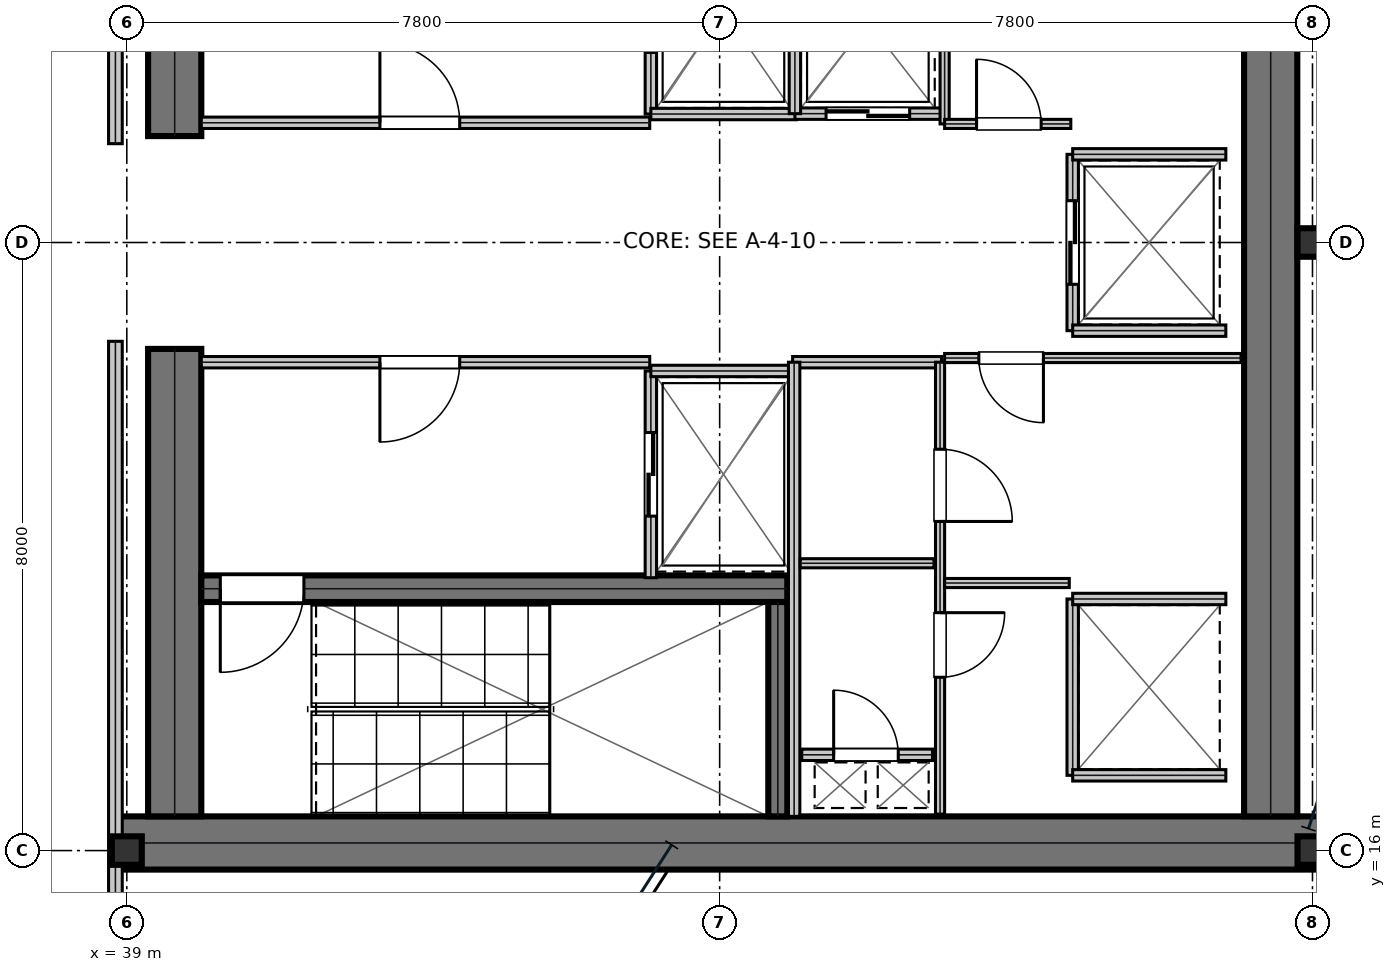
"""IFC4 building model, lengths in metres.
Left out: names, types, materials, properties, quantities, classifications, styles, units other than length and angle.
Written with IfcOpenShell. Run it as: python <this file> out.ifc"""

import sys

from ifc_helpers import new_model, si_unit, direction, frame, frame_2d, origin, origin_2d, place, context, subcontext, project, spatial, rectangle, i_section, extrude, element, fill, save


model = new_model("IFC4")
c1 = context("Model", 3, precision=1e-05, world=origin(), true_north=direction((0.0, 1.0)))
c2 = subcontext(c1, "Body", "Model", "MODEL_VIEW")
j1 = project(units=[si_unit("LENGTHUNIT", "METRE"), si_unit("PLANEANGLEUNIT", "RADIAN")], contexts=[c1])
p1 = place(None, origin())
s1 = spatial("IfcSite", under=j1, at=p1, CompositionType="ELEMENT")
p2 = place(p1, origin())
s2 = spatial("IfcBuilding", under=s1, at=p2, CompositionType="ELEMENT")
p3 = place(p2, frame((0.0, 0.0, 199.95)))
s3 = spatial("IfcBuildingStorey", under=s2, at=p3, CompositionType="ELEMENT", Elevation=199.95)
p4 = place(p3, frame((38.8, 16.1, 0.0), z_axis=(0.0, 0.0, 1.0), x_axis=(1.0, 0.0, 0.0)))
e1 = element("IfcWall", 1, at=p4, inside=s3, PredefinedType="SHEAR", context=c2, shape_type="SweptSolid", body=[
    extrude(rectangle(XDim=16.0, YDim=0.7, at=frame_2d((8.0, 0.0))), origin(), (0.0, 0.0, 1.0), 3.79),
])
for number, where, z_axis, x_axis in (
    (2, (39.63, 16.45, 0.0), (0.0, 0.0, 1.0), (0.0, 1.0, 0.0)),
    (3, (39.63, 25.4, 0.0), (0.0, 0.0, 1.0), (0.0, 1.0, 0.0)),
):
    element("IfcWall", number, at=place(p3, frame(where, z_axis=z_axis, x_axis=x_axis)), inside=s3, PredefinedType="SHEAR", context=c2, shape_type="SweptSolid", body=[
        extrude(rectangle(XDim=6.15, YDim=0.7, at=frame_2d((3.075, 0.0))), origin(), (0.0, 0.0, 1.0), 3.79),
    ])
p5 = place(p3, frame((54.05, 16.45, 0.0), z_axis=(0.0, 0.0, 1.0), x_axis=(0.0, 1.0, 0.0)))
e4 = element("IfcWall", 4, at=p5, inside=s3, PredefinedType="SHEAR", context=c2, shape_type="SweptSolid", body=[
    extrude(rectangle(XDim=15.1, YDim=0.7, at=frame_2d((7.55, 0.0))), origin(), (0.0, 0.0, 1.0), 3.79),
])
p6 = place(p3, frame((39.98, 19.445, 0.0), z_axis=(0.0, 0.0, 1.0), x_axis=(1.0, 0.0, 0.0)))
e5 = element("IfcWall", 5, at=p6, inside=s3, PredefinedType="SHEAR", context=c2, shape_type="SweptSolid", body=[
    extrude(rectangle(XDim=7.71, YDim=0.35, at=frame_2d((3.855, 0.0))), origin(), (0.0, 0.0, 1.0), 3.79),
])
p7 = place(p6, frame((0.25, 0.0, 0.0)))
e6 = element("IfcOpeningElement", 6, at=p7, cuts=e5, PredefinedType="OPENING", context=c2, shape_type="SweptSolid", body=[
    extrude(rectangle(XDim=1.1, YDim=2.15, at=frame_2d((0.55, 1.075))), frame((0.0, 0.185, 0.0), z_axis=(0.0, -1.0, 0.0), x_axis=(1.0, 0.0, 0.0)), (0.0, 0.0, 1.0), 0.37),
])
p8 = place(p3, frame((47.565, 16.45, 0.0), z_axis=(0.0, 0.0, 1.0), x_axis=(0.0, 1.0, 0.0)))
e7 = element("IfcWall", 7, at=p8, inside=s3, PredefinedType="SHEAR", context=c2, shape_type="SweptSolid", body=[
    extrude(rectangle(XDim=2.82, YDim=0.25, at=frame_2d((1.41, 0.0))), origin(), (0.0, 0.0, 1.0), 3.79),
])
for number, where, z_axis, x_axis in (
    (8, (39.0, 16.0, 0.0), (0.0, 0.0, 1.0), (1.0, 0.0, 0.0)),
    (9, (54.6, 16.0, 0.0), (0.0, 0.0, 1.0), (1.0, 0.0, 0.0)),
    (10, (54.6, 24.0, 0.0), (0.0, 0.0, 1.0), (1.0, 0.0, 0.0)),
):
    element("IfcColumn", number, at=place(p3, frame(where, z_axis=z_axis, x_axis=x_axis)), inside=s3, PredefinedType="COLUMN", context=c2, shape_type="SweptSolid", body=[
        extrude(i_section(OverallWidth=0.394, OverallDepth=0.375, WebThickness=0.017, FlangeThickness=0.028, at=origin_2d()), origin(), (0.0, 0.0, 1.0), 4.044),
    ])
p9 = place(p3, frame((39.98, 25.575, 0.0), z_axis=(0.0, 0.0, 1.0), x_axis=(1.0, 0.0, 0.0)))
e11 = element("IfcWall", 11, at=p9, inside=s3, PredefinedType="PARTITIONING", context=c2, shape_type="SweptSolid", body=[
    extrude(rectangle(XDim=5.9, YDim=0.15, at=frame_2d((2.95, 0.0))), origin(), (0.0, 0.0, 1.0), 3.79),
])
p10 = place(p9, frame((2.35, 0.0, 0.0)))
e12 = element("IfcOpeningElement", 12, at=p10, cuts=e11, PredefinedType="OPENING", context=c2, shape_type="SweptSolid", body=[
    extrude(rectangle(XDim=1.05, YDim=2.15, at=frame_2d((0.525, 1.075))), frame((0.0, 0.085, 0.0), z_axis=(0.0, -1.0, 0.0), x_axis=(1.0, 0.0, 0.0)), (0.0, 0.0, 1.0), 0.17),
])
p11 = place(p3, frame((39.98, 22.425, 0.0), z_axis=(0.0, 0.0, 1.0), x_axis=(1.0, 0.0, 0.0)))
e13 = element("IfcWall", 13, at=p11, inside=s3, PredefinedType="PARTITIONING", context=c2, shape_type="SweptSolid", body=[
    extrude(rectangle(XDim=5.9, YDim=0.15, at=frame_2d((2.95, 0.0))), origin(), (0.0, 0.0, 1.0), 3.79),
])
p12 = place(p11, frame((2.35, 0.0, 0.0)))
e14 = element("IfcOpeningElement", 14, at=p12, cuts=e13, PredefinedType="OPENING", context=c2, shape_type="SweptSolid", body=[
    extrude(rectangle(XDim=1.05, YDim=2.15, at=frame_2d((0.525, 1.075))), frame((0.0, 0.085, 0.0), z_axis=(0.0, -1.0, 0.0), x_axis=(1.0, 0.0, 0.0)), (0.0, 0.0, 1.0), 0.17),
])
p13 = place(p3, frame((45.895, 25.69, 0.0), z_axis=(0.0, 0.0, 1.0), x_axis=(0.0, 1.0, 0.0)))
e15 = element("IfcWall", 15, at=p13, inside=s3, PredefinedType="PARTITIONING", context=c2, shape_type="SweptSolid", body=[
    extrude(rectangle(XDim=2.72, YDim=0.15, at=frame_2d((1.36, 0.0))), origin(), (0.0, 0.0, 1.0), 3.79),
])
p14 = place(p13, frame((0.81, 0.0, 0.0)))
e16 = element("IfcOpeningElement", 16, at=p14, cuts=e15, PredefinedType="OPENING", context=c2, shape_type="SweptSolid", body=[
    extrude(rectangle(XDim=1.1, YDim=2.15, at=frame_2d((0.55, 1.075))), frame((0.0, 0.085, 0.0), z_axis=(0.0, -1.0, 0.0), x_axis=(1.0, 0.0, 0.0)), (0.0, 0.0, 1.0), 0.17),
])
p15 = place(p3, frame((45.895, 25.69, 0.0), z_axis=(0.0, 0.0, 1.0), x_axis=(1.0, 0.0, 0.0)))
e17 = element("IfcWall", 17, at=p15, inside=s3, PredefinedType="PARTITIONING", context=c2, shape_type="SweptSolid", body=[
    extrude(rectangle(XDim=1.915, YDim=0.15, at=frame_2d((0.958, 0.0))), origin(), (0.0, 0.0, 1.0), 3.79),
])
p16 = place(p3, frame((45.895, 19.59, 0.0), z_axis=(0.0, 0.0, 1.0), x_axis=(0.0, 1.0, 0.0)))
e18 = element("IfcWall", 18, at=p16, inside=s3, PredefinedType="PARTITIONING", context=c2, shape_type="SweptSolid", body=[
    extrude(rectangle(XDim=2.72, YDim=0.15, at=frame_2d((1.36, 0.0))), origin(), (0.0, 0.0, 1.0), 3.79),
])
p17 = place(p16, frame((0.81, 0.0, 0.0)))
e19 = element("IfcOpeningElement", 19, at=p17, cuts=e18, PredefinedType="OPENING", context=c2, shape_type="SweptSolid", body=[
    extrude(rectangle(XDim=1.1, YDim=2.15, at=frame_2d((0.55, 1.075))), frame((0.0, 0.085, 0.0), z_axis=(0.0, -1.0, 0.0), x_axis=(1.0, 0.0, 0.0)), (0.0, 0.0, 1.0), 0.17),
])
p18 = place(p3, frame((45.895, 22.31, 0.0), z_axis=(0.0, 0.0, 1.0), x_axis=(1.0, 0.0, 0.0)))
e20 = element("IfcWall", 20, at=p18, inside=s3, PredefinedType="PARTITIONING", context=c2, shape_type="SweptSolid", body=[
    extrude(rectangle(XDim=1.915, YDim=0.15, at=frame_2d((0.958, 0.0))), origin(), (0.0, 0.0, 1.0), 3.79),
])
p19 = place(p3, frame((47.79, 25.695, 0.0), z_axis=(0.0, 0.0, 1.0), x_axis=(1.0, 0.0, 0.0)))
e21 = element("IfcWall", 21, at=p19, inside=s3, PredefinedType="PARTITIONING", context=c2, shape_type="SweptSolid", body=[
    extrude(rectangle(XDim=1.92, YDim=0.15, at=frame_2d((0.96, 0.0))), origin(), (0.0, 0.0, 1.0), 3.79),
])
p20 = place(p19, frame((0.41, 0.0, 0.0)))
e22 = element("IfcOpeningElement", 22, at=p20, cuts=e21, PredefinedType="OPENING", context=c2, shape_type="SweptSolid", body=[
    extrude(rectangle(XDim=1.1, YDim=2.15, at=frame_2d((0.55, 1.075))), frame((0.0, 0.085, 0.0), z_axis=(0.0, -1.0, 0.0), x_axis=(1.0, 0.0, 0.0)), (0.0, 0.0, 1.0), 0.17),
])
p21 = place(p3, frame((47.79, 25.695, 0.0), z_axis=(0.0, 0.0, 1.0), x_axis=(0.0, 1.0, 0.0)))
e23 = element("IfcWall", 23, at=p21, inside=s3, PredefinedType="PARTITIONING", context=c2, shape_type="SweptSolid", body=[
    extrude(rectangle(XDim=2.415, YDim=0.15, at=frame_2d((1.208, 0.0))), origin(), (0.0, 0.0, 1.0), 3.79),
])
p22 = place(p3, frame((51.445, 22.84, 0.0), z_axis=(0.0, 0.0, 1.0), x_axis=(0.0, 1.0, 0.0)))
e24 = element("IfcWall", 24, at=p22, inside=s3, PredefinedType="PARTITIONING", context=c2, shape_type="SweptSolid", body=[
    extrude(rectangle(XDim=2.32, YDim=0.15, at=frame_2d((1.16, 0.0))), origin(), (0.0, 0.0, 1.0), 3.79),
])
p23 = place(p22, frame((0.61, 0.0, 0.0)))
e25 = element("IfcOpeningElement", 25, at=p23, cuts=e24, PredefinedType="OPENING", context=c2, shape_type="SweptSolid", body=[
    extrude(rectangle(XDim=1.1, YDim=2.15, at=frame_2d((0.55, 1.075))), frame((0.0, 0.085, 0.0), z_axis=(0.0, -1.0, 0.0), x_axis=(1.0, 0.0, 0.0)), (0.0, 0.0, 1.0), 0.17),
])
for number, where, z_axis, x_axis in (
    (26, (51.445, 22.84, 0.0), (0.0, 0.0, 1.0), (1.0, 0.0, 0.0)),
    (27, (51.445, 25.16, 0.0), (0.0, 0.0, 1.0), (1.0, 0.0, 0.0)),
):
    element("IfcWall", number, at=place(p3, frame(where, z_axis=z_axis, x_axis=x_axis)), inside=s3, PredefinedType="PARTITIONING", context=c2, shape_type="SweptSolid", body=[
        extrude(rectangle(XDim=2.015, YDim=0.15, at=frame_2d((1.007, 0.0))), origin(), (0.0, 0.0, 1.0), 3.79),
    ])
p24 = place(p3, frame((51.445, 16.99, 0.0), z_axis=(0.0, 0.0, 1.0), x_axis=(0.0, 1.0, 0.0)))
e28 = element("IfcWall", 28, at=p24, inside=s3, PredefinedType="PARTITIONING", context=c2, shape_type="SweptSolid", body=[
    extrude(rectangle(XDim=2.32, YDim=0.15, at=frame_2d((1.16, 0.0))), origin(), (0.0, 0.0, 1.0), 3.79),
])
for number, where, z_axis, x_axis in (
    (29, (51.445, 16.99, 0.0), (0.0, 0.0, 1.0), (1.0, 0.0, 0.0)),
    (30, (51.445, 19.31, 0.0), (0.0, 0.0, 1.0), (1.0, 0.0, 0.0)),
):
    element("IfcWall", number, at=place(p3, frame(where, z_axis=z_axis, x_axis=x_axis)), inside=s3, PredefinedType="PARTITIONING", context=c2, shape_type="SweptSolid", body=[
        extrude(rectangle(XDim=2.015, YDim=0.15, at=frame_2d((1.007, 0.0))), origin(), (0.0, 0.0, 1.0), 3.79),
    ])
p25 = place(p3, frame((47.88, 17.26, 0.0), z_axis=(0.0, 0.0, 1.0), x_axis=(1.0, 0.0, 0.0)))
e31 = element("IfcWall", 31, at=p25, inside=s3, PredefinedType="PARTITIONING", context=c2, shape_type="SweptSolid", body=[
    extrude(rectangle(XDim=1.72, YDim=0.15, at=frame_2d((0.86, 0.0))), origin(), (0.0, 0.0, 1.0), 3.79),
])
p26 = place(p25, frame((0.42, 0.0, 0.0)))
e32 = element("IfcOpeningElement", 32, at=p26, cuts=e31, PredefinedType="OPENING", context=c2, shape_type="SweptSolid", body=[
    extrude(rectangle(XDim=0.85, YDim=2.15, at=frame_2d((0.425, 1.075))), frame((0.0, 0.085, 0.0), z_axis=(0.0, -1.0, 0.0), x_axis=(1.0, 0.0, 0.0)), (0.0, 0.0, 1.0), 0.17),
])
p27 = place(p3, frame((47.76, 22.425, 0.0), z_axis=(0.0, 0.0, 1.0), x_axis=(1.0, 0.0, 0.0)))
e33 = element("IfcWall", 33, at=p27, inside=s3, PredefinedType="PARTITIONING", context=c2, shape_type="SweptSolid", body=[
    extrude(rectangle(XDim=1.96, YDim=0.15, at=frame_2d((0.98, 0.0))), origin(), (0.0, 0.0, 1.0), 3.79),
])
p28 = place(p3, frame((47.78, 16.45, 0.0), z_axis=(0.0, 0.0, 1.0), x_axis=(0.0, 1.0, 0.0)))
e34 = element("IfcWall", 34, at=p28, inside=s3, PredefinedType="PARTITIONING", context=c2, shape_type="SweptSolid", body=[
    extrude(rectangle(XDim=5.975, YDim=0.15, at=frame_2d((2.988, 0.0))), origin(), (0.0, 0.0, 1.0), 3.79),
])
p29 = place(p3, frame((47.86, 19.78, 0.0), z_axis=(0.0, 0.0, 1.0), x_axis=(1.0, 0.0, 0.0)))
e35 = element("IfcWall", 35, at=p29, inside=s3, PredefinedType="PARTITIONING", context=c2, shape_type="SweptSolid", body=[
    extrude(rectangle(XDim=1.76, YDim=0.12, at=frame_2d((0.88, 0.0))), origin(), (0.0, 0.0, 1.0), 3.79),
])
p30 = place(p3, frame((49.7, 16.48, 0.0), z_axis=(0.0, 0.0, 1.0), x_axis=(0.0, 1.0, 0.0)))
e36 = element("IfcWall", 36, at=p30, inside=s3, PredefinedType="PARTITIONING", context=c2, shape_type="SweptSolid", body=[
    extrude(rectangle(XDim=5.945, YDim=0.12, at=frame_2d((2.973, 0.0))), origin(), (0.0, 0.0, 1.0), 3.79),
])
p31 = place(p30, frame((1.8, 0.0, 0.0)))
e37 = element("IfcOpeningElement", 37, at=p31, cuts=e36, PredefinedType="OPENING", context=c2, shape_type="SweptSolid", body=[
    extrude(rectangle(XDim=0.85, YDim=2.15, at=frame_2d((0.425, 1.075))), frame((0.0, 0.07, 0.0), z_axis=(0.0, -1.0, 0.0), x_axis=(1.0, 0.0, 0.0)), (0.0, 0.0, 1.0), 0.14),
])
p32 = place(p30, frame((3.85, 0.0, 0.0)))
e38 = element("IfcOpeningElement", 38, at=p32, cuts=e36, PredefinedType="OPENING", context=c2, shape_type="SweptSolid", body=[
    extrude(rectangle(XDim=0.95, YDim=2.15, at=frame_2d((0.475, 1.075))), frame((0.0, 0.07, 0.0), z_axis=(0.0, -1.0, 0.0), x_axis=(1.0, 0.0, 0.0)), (0.0, 0.0, 1.0), 0.14),
])
p33 = place(p3, frame((49.76, 22.48, 0.0), z_axis=(0.0, 0.0, 1.0), x_axis=(1.0, 0.0, 0.0)))
e39 = element("IfcWall", 39, at=p33, inside=s3, PredefinedType="PARTITIONING", context=c2, shape_type="SweptSolid", body=[
    extrude(rectangle(XDim=3.9, YDim=0.12, at=frame_2d((1.95, 0.0))), origin(), (0.0, 0.0, 1.0), 3.79),
])
p34 = place(p33, frame((0.45, 0.0, 0.0)))
e40 = element("IfcOpeningElement", 40, at=p34, cuts=e39, PredefinedType="OPENING", context=c2, shape_type="SweptSolid", body=[
    extrude(rectangle(XDim=0.85, YDim=2.15, at=frame_2d((0.425, 1.075))), frame((0.0, 0.07, 0.0), z_axis=(0.0, -1.0, 0.0), x_axis=(1.0, 0.0, 0.0)), (0.0, 0.0, 1.0), 0.14),
])
p35 = place(p3, frame((49.76, 19.52, 0.0), z_axis=(0.0, 0.0, 1.0), x_axis=(1.0, 0.0, 0.0)))
e41 = element("IfcWall", 41, at=p35, inside=s3, PredefinedType="PARTITIONING", context=c2, shape_type="SweptSolid", body=[
    extrude(rectangle(XDim=1.64, YDim=0.12, at=frame_2d((0.82, 0.0))), origin(), (0.0, 0.0, 1.0), 3.79),
])
p36 = place(p3, frame((49.76, 25.56, 0.0), z_axis=(0.0, 0.0, 1.0), x_axis=(0.0, 1.0, 0.0)))
e42 = element("IfcWall", 42, at=p36, inside=s3, PredefinedType="PARTITIONING", context=c2, shape_type="SweptSolid", body=[
    extrude(rectangle(XDim=2.66, YDim=0.12, at=frame_2d((1.33, 0.0))), origin(), (0.0, 0.0, 1.0), 3.79),
])
p37 = place(p3, frame((49.76, 25.56, 0.0), z_axis=(0.0, 0.0, 1.0), x_axis=(1.0, 0.0, 0.0)))
e43 = element("IfcWall", 43, at=p37, inside=s3, PredefinedType="PARTITIONING", context=c2, shape_type="SweptSolid", body=[
    extrude(rectangle(XDim=1.66, YDim=0.12, at=frame_2d((0.83, 0.0))), origin(), (0.0, 0.0, 1.0), 3.79),
])
p38 = place(p37, frame((0.42, 0.0, 0.0)))
e44 = element("IfcOpeningElement", 44, at=p38, cuts=e43, PredefinedType="OPENING", context=c2, shape_type="SweptSolid", body=[
    extrude(rectangle(XDim=0.85, YDim=2.15, at=frame_2d((0.425, 1.075))), frame((0.0, 0.07, 0.0), z_axis=(0.0, -1.0, 0.0), x_axis=(1.0, 0.0, 0.0)), (0.0, 0.0, 1.0), 0.14),
])
for number, where, z_axis, x_axis in (
    (45, (38.85, 14.5, 0.0), (0.0, 0.0, 1.0), (0.0, 1.0, 0.0)),
    (46, (38.85, 25.3, 0.0), (0.0, 0.0, 1.0), (0.0, 1.0, 0.0)),
):
    element("IfcWall", number, at=place(p3, frame(where, z_axis=z_axis, x_axis=x_axis)), inside=s3, PredefinedType="SOLIDWALL", context=c2, shape_type="SweptSolid", body=[
        extrude(rectangle(XDim=8.2, YDim=0.18, at=frame_2d((4.1, 0.0))), origin(), (0.0, 0.0, 1.0), 3.241),
    ])
p39 = place(p10, origin())
e47 = element("IfcDoor", 47, at=p39, inside=s3, OperationType="SINGLE_SWING_LEFT", PredefinedType="DOOR", context=c2, shape_type="SweptSolid", body=[
    extrude(rectangle(XDim=1.05, YDim=2.15, at=frame_2d((0.525, 1.075))), frame((0.0, 0.025, 0.0), z_axis=(0.0, -1.0, 0.0), x_axis=(1.0, 0.0, 0.0)), (0.0, 0.0, 1.0), 0.05),
])
fill(e12, e47)
p40 = place(p12, frame((1.05, 0.0, 0.0), z_axis=(0.0, 0.0, 1.0), x_axis=(-1.0, 0.0, 0.0)))
e48 = element("IfcDoor", 48, at=p40, inside=s3, OperationType="SINGLE_SWING_RIGHT", PredefinedType="DOOR", context=c2, shape_type="SweptSolid", body=[
    extrude(rectangle(XDim=1.05, YDim=2.15, at=frame_2d((0.525, 1.075))), frame((0.0, 0.025, 0.0), z_axis=(0.0, -1.0, 0.0), x_axis=(1.0, 0.0, 0.0)), (0.0, 0.0, 1.0), 0.05),
])
fill(e14, e48)
p41 = place(p17, frame((1.1, 0.0, 0.0), z_axis=(0.0, 0.0, 1.0), x_axis=(-1.0, 0.0, 0.0)))
e49 = element("IfcDoor", 49, at=p41, inside=s3, OperationType="DOUBLE_DOOR_SLIDING", PredefinedType="DOOR", context=c2, shape_type="SweptSolid", body=[
    extrude(rectangle(XDim=1.1, YDim=2.15, at=frame_2d((0.55, 1.075))), frame((0.0, 0.025, 0.0), z_axis=(0.0, -1.0, 0.0), x_axis=(1.0, 0.0, 0.0)), (0.0, 0.0, 1.0), 0.05),
])
fill(e19, e49)
p42 = place(p20, frame((1.1, 0.0, 0.0), z_axis=(0.0, 0.0, 1.0), x_axis=(-1.0, 0.0, 0.0)))
e50 = element("IfcDoor", 50, at=p42, inside=s3, OperationType="DOUBLE_DOOR_SLIDING", PredefinedType="DOOR", context=c2, shape_type="SweptSolid", body=[
    extrude(rectangle(XDim=1.1, YDim=2.15, at=frame_2d((0.55, 1.075))), frame((0.0, 0.025, 0.0), z_axis=(0.0, -1.0, 0.0), x_axis=(1.0, 0.0, 0.0)), (0.0, 0.0, 1.0), 0.05),
])
fill(e22, e50)
p43 = place(p23, frame((1.1, 0.0, 0.0), z_axis=(0.0, 0.0, 1.0), x_axis=(-1.0, 0.0, 0.0)))
e51 = element("IfcDoor", 51, at=p43, inside=s3, OperationType="DOUBLE_DOOR_SLIDING", PredefinedType="DOOR", context=c2, shape_type="SweptSolid", body=[
    extrude(rectangle(XDim=1.1, YDim=2.15, at=frame_2d((0.55, 1.075))), frame((0.0, 0.025, 0.0), z_axis=(0.0, -1.0, 0.0), x_axis=(1.0, 0.0, 0.0)), (0.0, 0.0, 1.0), 0.05),
])
fill(e25, e51)
p44 = place(p26, origin())
e52 = element("IfcDoor", 52, at=p44, inside=s3, OperationType="SINGLE_SWING_LEFT", PredefinedType="TRAPDOOR", context=c2, shape_type="SweptSolid", body=[
    extrude(rectangle(XDim=0.85, YDim=2.15, at=frame_2d((0.425, 1.075))), frame((0.0, 0.025, 0.0), z_axis=(0.0, -1.0, 0.0), x_axis=(1.0, 0.0, 0.0)), (0.0, 0.0, 1.0), 0.05),
])
fill(e32, e52)
p45 = place(p31, frame((0.85, 0.0, 0.0), z_axis=(0.0, 0.0, 1.0), x_axis=(-1.0, 0.0, 0.0)))
e53 = element("IfcDoor", 53, at=p45, inside=s3, OperationType="SINGLE_SWING_LEFT", PredefinedType="DOOR", context=c2, shape_type="SweptSolid", body=[
    extrude(rectangle(XDim=0.85, YDim=2.15, at=frame_2d((0.425, 1.075))), frame((0.0, 0.025, 0.0), z_axis=(0.0, -1.0, 0.0), x_axis=(1.0, 0.0, 0.0)), (0.0, 0.0, 1.0), 0.05),
])
fill(e37, e53)
p46 = place(p32, frame((0.95, 0.0, 0.0), z_axis=(0.0, 0.0, 1.0), x_axis=(-1.0, 0.0, 0.0)))
e54 = element("IfcDoor", 54, at=p46, inside=s3, OperationType="SINGLE_SWING_RIGHT", PredefinedType="DOOR", context=c2, shape_type="SweptSolid", body=[
    extrude(rectangle(XDim=0.95, YDim=2.15, at=frame_2d((0.475, 1.075))), frame((0.0, 0.025, 0.0), z_axis=(0.0, -1.0, 0.0), x_axis=(1.0, 0.0, 0.0)), (0.0, 0.0, 1.0), 0.05),
])
fill(e38, e54)
p47 = place(p34, frame((0.85, 0.0, 0.0), z_axis=(0.0, 0.0, 1.0), x_axis=(-1.0, 0.0, 0.0)))
e55 = element("IfcDoor", 55, at=p47, inside=s3, OperationType="SINGLE_SWING_LEFT", PredefinedType="DOOR", context=c2, shape_type="SweptSolid", body=[
    extrude(rectangle(XDim=0.85, YDim=2.15, at=frame_2d((0.425, 1.075))), frame((0.0, 0.025, 0.0), z_axis=(0.0, -1.0, 0.0), x_axis=(1.0, 0.0, 0.0)), (0.0, 0.0, 1.0), 0.05),
])
fill(e40, e55)
p48 = place(p38, origin())
e56 = element("IfcDoor", 56, at=p48, inside=s3, OperationType="SINGLE_SWING_LEFT", PredefinedType="DOOR", context=c2, shape_type="SweptSolid", body=[
    extrude(rectangle(XDim=0.85, YDim=2.15, at=frame_2d((0.425, 1.075))), frame((0.0, 0.025, 0.0), z_axis=(0.0, -1.0, 0.0), x_axis=(1.0, 0.0, 0.0)), (0.0, 0.0, 1.0), 0.05),
])
fill(e44, e56)
p49 = place(p7, frame((1.1, 0.0, 0.0), z_axis=(0.0, 0.0, 1.0), x_axis=(-1.0, 0.0, 0.0)))
e57 = element("IfcDoor", 57, at=p49, inside=s3, OperationType="SINGLE_SWING_RIGHT", PredefinedType="DOOR", context=c2, shape_type="SweptSolid", body=[
    extrude(rectangle(XDim=1.1, YDim=2.15, at=frame_2d((0.55, 1.075))), frame((0.0, 0.025, 0.0), z_axis=(0.0, -1.0, 0.0), x_axis=(1.0, 0.0, 0.0)), (0.0, 0.0, 1.0), 0.05),
])
fill(e6, e57)
save(model, sys.argv[1])
